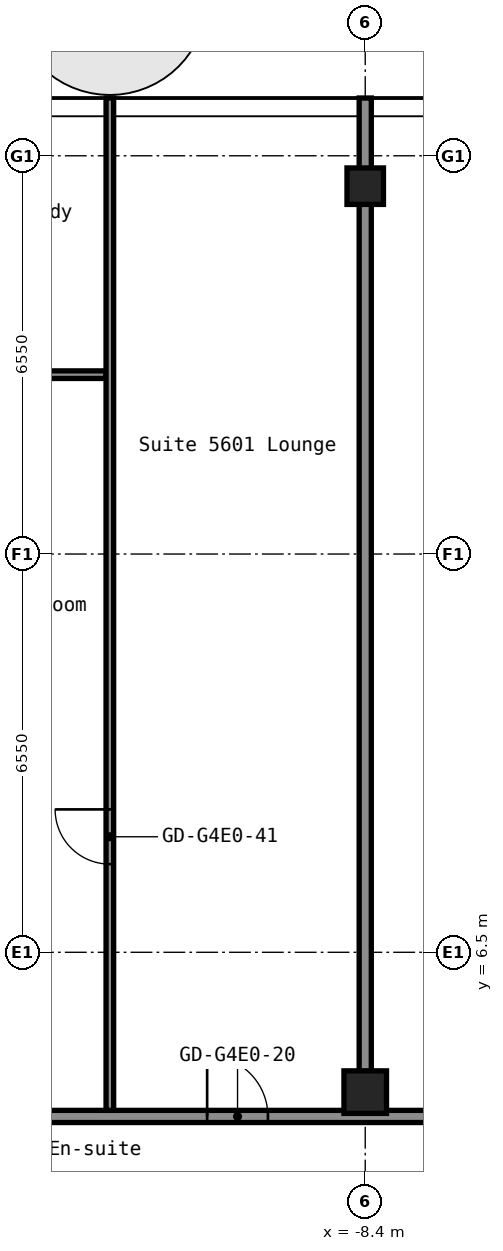
"""IFC4 building model, lengths in metres.
Left out: names, types, materials, properties, quantities, classifications, styles, units other than length and angle.
Written with IfcOpenShell. Run it as: python <this file> out.ifc"""

import sys

from ifc_helpers import new_model, si_unit, direction, frame, frame_2d, origin, origin_2d, place, context, subcontext, project, spatial, rectangle, hollow_rectangle, extrude, element, fill, save


model = new_model("IFC4")
c1 = context("Model", 3, precision=1e-05, world=origin(), true_north=direction((0.0, 1.0)))
c2 = subcontext(c1, "Body", "Model", "MODEL_VIEW")
j1 = project(units=[si_unit("LENGTHUNIT", "METRE"), si_unit("PLANEANGLEUNIT", "RADIAN")], contexts=[c1])
p1 = place(None, origin())
s1 = spatial("IfcSite", under=j1, at=p1, CompositionType="ELEMENT")
p2 = place(p1, origin())
s2 = spatial("IfcBuilding", under=s1, at=p2, CompositionType="ELEMENT")
p3 = place(p2, frame((0.0, 0.0, 199.4)))
s3 = spatial("IfcBuildingStorey", under=s2, at=p3, CompositionType="ELEMENT", Elevation=199.4)
p4 = place(p3, frame((-8.4, 4.2, 0.0), z_axis=(0.0, 0.0, 1.0), x_axis=(1.0, 0.0, 0.0)))
e1 = element("IfcColumn", 1, at=p4, inside=s3, PredefinedType="COLUMN", context=c2, shape_type="SweptSolid", body=[
    extrude(hollow_rectangle(XDim=0.7, YDim=0.7, WallThickness=0.028, at=origin_2d()), origin(), (0.0, 0.0, 1.0), 2.75),
])
p5 = place(p3, frame((-8.4, 19.1, 0.0), z_axis=(0.0, 0.0, 1.0), x_axis=(1.0, 0.0, 0.0)))
e2 = element("IfcColumn", 2, at=p5, inside=s3, PredefinedType="COLUMN", context=c2, shape_type="SweptSolid", body=[
    extrude(hollow_rectangle(XDim=0.6, YDim=0.6, WallThickness=0.025, InnerFilletRadius=0.038, OuterFilletRadius=0.062, at=origin_2d()), origin(), (0.0, 0.0, 1.0), 2.75),
])
p6 = place(p3, frame((-16.8, 3.8, 0.0), z_axis=(0.0, 0.0, 1.0), x_axis=(1.0, 0.0, 0.0)))
e3 = element("IfcWall", 3, at=p6, inside=s3, PredefinedType="PARTITIONING", context=c2, shape_type="SweptSolid", body=[
    extrude(rectangle(XDim=33.6, YDim=0.2, at=frame_2d((16.8, 0.0))), origin(), (0.0, 0.0, 1.0), 2.75),
])
p7 = place(p6, frame((5.8, 0.0, 0.0)))
e4 = element("IfcOpeningElement", 4, at=p7, cuts=e3, PredefinedType="OPENING", context=c2, shape_type="SweptSolid", body=[
    extrude(rectangle(XDim=1.0, YDim=2.1, at=frame_2d((0.5, 1.05))), frame((0.0, 0.11, 0.0), z_axis=(0.0, -1.0, 0.0), x_axis=(1.0, 0.0, 0.0)), (0.0, 0.0, 1.0), 0.22),
])
p8 = place(p6, frame((10.3, 0.0, 0.0)))
e5 = element("IfcOpeningElement", 5, at=p8, cuts=e3, PredefinedType="OPENING", context=c2, shape_type="SweptSolid", body=[
    extrude(rectangle(XDim=1.0, YDim=2.1, at=frame_2d((0.5, 1.05))), frame((0.0, 0.11, 0.0), z_axis=(0.0, -1.0, 0.0), x_axis=(1.0, 0.0, 0.0)), (0.0, 0.0, 1.0), 0.22),
])
p9 = place(p6, frame((22.6, 0.0, 0.0)))
e6 = element("IfcOpeningElement", 6, at=p9, cuts=e3, PredefinedType="OPENING", context=c2, shape_type="SweptSolid", body=[
    extrude(rectangle(XDim=1.0, YDim=2.1, at=frame_2d((0.5, 1.05))), frame((0.0, 0.11, 0.0), z_axis=(0.0, -1.0, 0.0), x_axis=(1.0, 0.0, 0.0)), (0.0, 0.0, 1.0), 0.22),
])
p10 = place(p6, frame((31.0, 0.0, 0.0)))
e7 = element("IfcOpeningElement", 7, at=p10, cuts=e3, PredefinedType="OPENING", context=c2, shape_type="SweptSolid", body=[
    extrude(rectangle(XDim=1.0, YDim=2.1, at=frame_2d((0.5, 1.05))), frame((0.0, 0.11, 0.0), z_axis=(0.0, -1.0, 0.0), x_axis=(1.0, 0.0, 0.0)), (0.0, 0.0, 1.0), 0.22),
])
p11 = place(p3, frame((-16.7, 16.0, 0.0), z_axis=(0.0, 0.0, 1.0), x_axis=(1.0, 0.0, 0.0)))
e8 = element("IfcWall", 8, at=p11, inside=s3, PredefinedType="PARTITIONING", context=c2, shape_type="SweptSolid", body=[
    extrude(rectangle(XDim=4.037, YDim=0.125, at=frame_2d((2.019, 0.0))), origin(), (0.0, 0.0, 1.0), 2.75),
])
p12 = place(p11, frame((1.55, 0.0, 0.0)))
e9 = element("IfcOpeningElement", 9, at=p12, cuts=e8, PredefinedType="OPENING", context=c2, shape_type="SweptSolid", body=[
    extrude(rectangle(XDim=0.9, YDim=2.1, at=frame_2d((0.45, 1.05))), frame((0.0, 0.073, 0.0), z_axis=(0.0, -1.0, 0.0), x_axis=(1.0, 0.0, 0.0)), (0.0, 0.0, 1.0), 0.145),
])
p13 = place(p3, frame((-12.6, 3.9, 0.0), z_axis=(0.0, 0.0, 1.0), x_axis=(0.0, 1.0, 0.0)))
e10 = element("IfcWall", 10, at=p13, inside=s3, PredefinedType="PARTITIONING", context=c2, shape_type="SweptSolid", body=[
    extrude(rectangle(XDim=16.65, YDim=0.125, at=frame_2d((8.325, 0.0))), origin(), (0.0, 0.0, 1.0), 2.75),
])
p14 = place(p13, frame((4.05, 0.0, 0.0)))
e11 = element("IfcOpeningElement", 11, at=p14, cuts=e10, PredefinedType="OPENING", context=c2, shape_type="SweptSolid", body=[
    extrude(rectangle(XDim=0.9, YDim=2.1, at=frame_2d((0.45, 1.05))), frame((0.0, 0.073, 0.0), z_axis=(0.0, -1.0, 0.0), x_axis=(1.0, 0.0, 0.0)), (0.0, 0.0, 1.0), 0.145),
])
p15 = place(p3, frame((-8.4, 4.54, 0.0), z_axis=(0.0, 0.0, 1.0), x_axis=(0.0, 1.0, 0.0)))
e12 = element("IfcWall", 12, at=p15, inside=s3, PredefinedType="PARTITIONING", context=c2, shape_type="SweptSolid", body=[
    extrude(rectangle(XDim=16.01, YDim=0.2, at=frame_2d((8.005, 0.0))), origin(), (0.0, 0.0, 1.0), 2.75),
])
p16 = place(p7, origin())
e13 = element("IfcDoor", 13, at=p16, inside=s3, OperationType="SINGLE_SWING_RIGHT", PredefinedType="DOOR", context=c2, shape_type="SweptSolid", body=[
    extrude(rectangle(XDim=1.0, YDim=2.1, at=frame_2d((0.5, 1.05))), frame((0.0, 0.025, 0.0), z_axis=(0.0, -1.0, 0.0), x_axis=(1.0, 0.0, 0.0)), (0.0, 0.0, 1.0), 0.05),
])
fill(e4, e13)
p17 = place(p14, origin())
e14 = element("IfcDoor", 14, at=p17, inside=s3, OperationType="SINGLE_SWING_LEFT", PredefinedType="DOOR", context=c2, shape_type="SweptSolid", body=[
    extrude(rectangle(XDim=0.9, YDim=2.1, at=frame_2d((0.45, 1.05))), frame((0.0, 0.025, 0.0), z_axis=(0.0, -1.0, 0.0), x_axis=(1.0, 0.0, 0.0)), (0.0, 0.0, 1.0), 0.05),
])
fill(e11, e14)
save(model, sys.argv[1])
